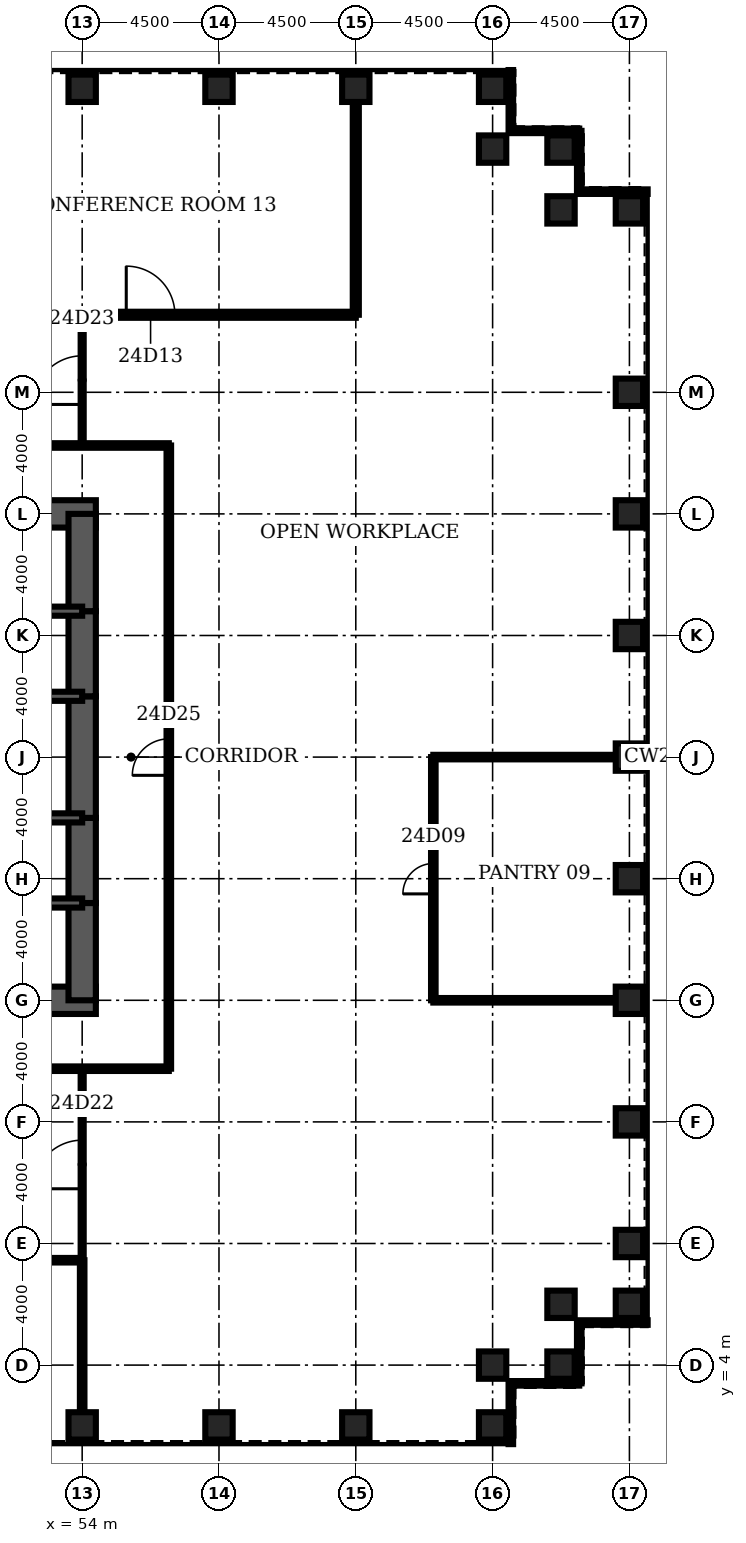
"""IFC4 building model, lengths in metres.
Left out: names, types, materials, properties, quantities, classifications, styles, units other than length and angle.
Written with IfcOpenShell. Run it as: python <this file> out.ifc"""

import sys

from ifc_helpers import new_model, si_unit, direction, frame, frame_2d, origin, origin_2d, place, context, subcontext, project, spatial, rectangle, hollow_rectangle, extrude, element, fill, save


model = new_model("IFC4")
c1 = context("Model", 3, precision=1e-05, world=origin(), true_north=direction((0.0, 1.0)))
c2 = subcontext(c1, "Body", "Model", "MODEL_VIEW")
j1 = project(units=[si_unit("LENGTHUNIT", "METRE"), si_unit("PLANEANGLEUNIT", "RADIAN")], contexts=[c1])
p1 = place(None, origin())
s1 = spatial("IfcSite", under=j1, at=p1, CompositionType="ELEMENT")
p2 = place(p1, origin())
s2 = spatial("IfcBuilding", under=s1, at=p2, CompositionType="ELEMENT")
p3 = place(p2, frame((0.0, 0.0, 113.1)))
s3 = spatial("IfcBuildingStorey", under=s2, at=p3, CompositionType="ELEMENT", Elevation=113.1)
for number, where, z_axis, x_axis in (
    (1, (54.0, 2.0, 0.0), (0.0, 0.0, 1.0), (0.0, 1.0, 0.0)),
    (2, (58.5, 2.0, 0.0), (0.0, 0.0, 1.0), (0.0, 1.0, 0.0)),
    (3, (63.0, 2.0, 0.0), (0.0, 0.0, 1.0), (0.0, 1.0, 0.0)),
    (4, (67.5, 2.0, 0.0), (0.0, 0.0, 1.0), (0.0, 1.0, 0.0)),
    (5, (67.5, 4.0, 0.0), (0.0, 0.0, 1.0), (0.0, 1.0, 0.0)),
    (6, (69.75, 4.0, 0.0), (0.0, 0.0, 1.0), (1.0, 0.0, 0.0)),
    (7, (69.75, 6.0, 0.0), (0.0, 0.0, 1.0), (1.0, 0.0, 0.0)),
    (8, (72.0, 6.0, 0.0), (0.0, 0.0, 1.0), (1.0, 0.0, 0.0)),
    (9, (72.0, 8.0, 0.0), (0.0, 0.0, 1.0), (1.0, 0.0, 0.0)),
    (10, (72.0, 12.0, 0.0), (0.0, 0.0, 1.0), (1.0, 0.0, 0.0)),
    (11, (72.0, 16.0, 0.0), (0.0, 0.0, 1.0), (1.0, 0.0, 0.0)),
    (12, (72.0, 20.0, 0.0), (0.0, 0.0, 1.0), (1.0, 0.0, 0.0)),
    (13, (72.0, 24.0, 0.0), (0.0, 0.0, 1.0), (1.0, 0.0, 0.0)),
    (14, (72.0, 28.0, 0.0), (0.0, 0.0, 1.0), (1.0, 0.0, 0.0)),
    (15, (72.0, 32.0, 0.0), (0.0, 0.0, 1.0), (1.0, 0.0, 0.0)),
    (16, (72.0, 36.0, 0.0), (0.0, 0.0, 1.0), (1.0, 0.0, 0.0)),
    (17, (72.0, 42.0, 0.0), (0.0, 0.0, 1.0), (1.0, 0.0, 0.0)),
    (18, (69.75, 42.0, 0.0), (0.0, 0.0, 1.0), (1.0, 0.0, 0.0)),
    (19, (69.75, 44.0, 0.0), (0.0, 0.0, 1.0), (1.0, 0.0, 0.0)),
    (20, (67.5, 44.0, 0.0), (0.0, 0.0, 1.0), (0.0, 1.0, 0.0)),
    (21, (67.5, 46.0, 0.0), (0.0, 0.0, 1.0), (0.0, 1.0, 0.0)),
    (22, (63.0, 46.0, 0.0), (0.0, 0.0, 1.0), (0.0, 1.0, 0.0)),
    (23, (58.5, 46.0, 0.0), (0.0, 0.0, 1.0), (0.0, 1.0, 0.0)),
    (24, (54.0, 46.0, 0.0), (0.0, 0.0, 1.0), (0.0, 1.0, 0.0)),
):
    element("IfcColumn", number, at=place(p3, frame(where, z_axis=z_axis, x_axis=x_axis)), inside=s3, PredefinedType="COLUMN", context=c2, shape_type="SweptSolid", body=[
        extrude(hollow_rectangle(XDim=0.9, YDim=0.9, WallThickness=0.11, at=origin_2d()), origin(), (0.0, 0.0, 1.0), 4.2),
    ])
for number, where, z_axis, x_axis in (
    (25, (45.0, 16.0, 0.0), (0.0, 0.0, 1.0), (1.0, 0.0, 0.0)),
    (26, (54.45, 32.0, 0.0), (0.0, 0.0, 1.0), (-1.0, 0.0, 0.0)),
):
    element("IfcWall", number, at=place(p3, frame(where, z_axis=z_axis, x_axis=x_axis)), inside=s3, PredefinedType="SHEAR", context=c2, shape_type="SweptSolid", body=[
        extrude(rectangle(XDim=9.45, YDim=0.9, at=frame_2d((4.725, 0.0))), origin(), (0.0, 0.0, 1.0), 4.2),
    ])
p4 = place(p3, frame((54.0, 16.0, 0.0), z_axis=(0.0, 0.0, 1.0), x_axis=(0.0, 1.0, 0.0)))
e27 = element("IfcWall", 27, at=p4, inside=s3, PredefinedType="SHEAR", context=c2, shape_type="SweptSolid", body=[
    extrude(rectangle(XDim=3.2, YDim=0.9, at=frame_2d((1.6, 0.0))), origin(), (0.0, 0.0, 1.0), 4.2),
])
p5 = place(p3, frame((54.0, 19.2, 0.0), z_axis=(0.0, 0.0, 1.0), x_axis=(0.0, 1.0, 0.0)))
e28 = element("IfcWall", 28, at=p5, inside=s3, PredefinedType="SHEAR", context=c2, shape_type="SweptSolid", body=[
    extrude(rectangle(XDim=2.8, YDim=0.9, at=frame_2d((1.4, 0.0))), origin(), (0.0, 0.0, 1.0), 4.2),
])
p6 = place(p5, frame((0.4, 0.0, 0.0)))
e29 = element("IfcOpeningElement", 29, at=p6, cuts=e28, PredefinedType="OPENING", context=c2, shape_type="SweptSolid", body=[
    extrude(rectangle(XDim=1.8, YDim=2.1, at=frame_2d((0.9, 1.05))), frame((0.0, 0.46, 0.0), z_axis=(0.0, -1.0, 0.0), x_axis=(1.0, 0.0, 0.0)), (0.0, 0.0, 1.0), 0.92),
])
p7 = place(p3, frame((54.0, 22.0, 0.0), z_axis=(0.0, 0.0, 1.0), x_axis=(0.0, 1.0, 0.0)))
e30 = element("IfcWall", 30, at=p7, inside=s3, PredefinedType="SHEAR", context=c2, shape_type="SweptSolid", body=[
    extrude(rectangle(XDim=4.0, YDim=0.9, at=frame_2d((2.0, 0.0))), origin(), (0.0, 0.0, 1.0), 4.2),
])
p8 = place(p3, frame((54.0, 26.0, 0.0), z_axis=(0.0, 0.0, 1.0), x_axis=(0.0, 1.0, 0.0)))
e31 = element("IfcWall", 31, at=p8, inside=s3, PredefinedType="SHEAR", context=c2, shape_type="SweptSolid", body=[
    extrude(rectangle(XDim=2.8, YDim=0.9, at=frame_2d((1.4, 0.0))), origin(), (0.0, 0.0, 1.0), 4.2),
])
p9 = place(p8, frame((0.6, 0.0, 0.0)))
e32 = element("IfcOpeningElement", 32, at=p9, cuts=e31, PredefinedType="OPENING", context=c2, shape_type="SweptSolid", body=[
    extrude(rectangle(XDim=1.8, YDim=2.1, at=frame_2d((0.9, 1.05))), frame((0.0, 0.46, 0.0), z_axis=(0.0, -1.0, 0.0), x_axis=(1.0, 0.0, 0.0)), (0.0, 0.0, 1.0), 0.92),
])
p10 = place(p3, frame((54.0, 28.8, 0.0), z_axis=(0.0, 0.0, 1.0), x_axis=(0.0, 1.0, 0.0)))
e33 = element("IfcWall", 33, at=p10, inside=s3, PredefinedType="SHEAR", context=c2, shape_type="SweptSolid", body=[
    extrude(rectangle(XDim=3.2, YDim=0.9, at=frame_2d((1.6, 0.0))), origin(), (0.0, 0.0, 1.0), 4.2),
])
p11 = place(p3, frame((45.0, 19.2, 0.0), z_axis=(0.0, 0.0, 1.0), x_axis=(1.0, 0.0, 0.0)))
e34 = element("IfcWall", 34, at=p11, inside=s3, PredefinedType="SOLIDWALL", context=c2, shape_type="SweptSolid", body=[
    extrude(rectangle(XDim=9.0, YDim=0.3, at=frame_2d((4.5, 0.0))), origin(), (0.0, 0.0, 1.0), 4.2),
])
p12 = place(p11, frame((7.35, 0.0, 0.0)))
e35 = element("IfcOpeningElement", 35, at=p12, cuts=e34, PredefinedType="OPENING", context=c2, shape_type="SweptSolid", body=[
    extrude(rectangle(XDim=1.0, YDim=2.1, at=frame_2d((0.5, 1.05))), frame((0.0, 0.16, 0.0), z_axis=(0.0, -1.0, 0.0), x_axis=(1.0, 0.0, 0.0)), (0.0, 0.0, 1.0), 0.32),
])
p13 = place(p3, frame((45.0, 28.8, 0.0), z_axis=(0.0, 0.0, 1.0), x_axis=(1.0, 0.0, 0.0)))
e36 = element("IfcWall", 36, at=p13, inside=s3, PredefinedType="SOLIDWALL", context=c2, shape_type="SweptSolid", body=[
    extrude(rectangle(XDim=9.0, YDim=0.3, at=frame_2d((4.5, 0.0))), origin(), (0.0, 0.0, 1.0), 4.2),
])
p14 = place(p13, frame((7.35, 0.0, 0.0)))
e37 = element("IfcOpeningElement", 37, at=p14, cuts=e36, PredefinedType="OPENING", context=c2, shape_type="SweptSolid", body=[
    extrude(rectangle(XDim=1.0, YDim=2.1, at=frame_2d((0.5, 1.05))), frame((0.0, 0.16, 0.0), z_axis=(0.0, -1.0, 0.0), x_axis=(1.0, 0.0, 0.0)), (0.0, 0.0, 1.0), 0.32),
])
p15 = place(p3, frame((48.0, 22.0, 0.0), z_axis=(0.0, 0.0, 1.0), x_axis=(1.0, 0.0, 0.0)))
e38 = element("IfcWall", 38, at=p15, inside=s3, PredefinedType="SOLIDWALL", context=c2, shape_type="SweptSolid", body=[
    extrude(rectangle(XDim=6.0, YDim=0.3, at=frame_2d((3.0, 0.0))), origin(), (0.0, 0.0, 1.0), 4.2),
])
p16 = place(p15, frame((2.0, 0.0, 0.0)))
e39 = element("IfcOpeningElement", 39, at=p16, cuts=e38, PredefinedType="OPENING", context=c2, shape_type="SweptSolid", body=[
    extrude(rectangle(XDim=1.0, YDim=2.1, at=frame_2d((0.5, 1.05))), frame((0.0, 0.16, 0.0), z_axis=(0.0, -1.0, 0.0), x_axis=(1.0, 0.0, 0.0)), (0.0, 0.0, 1.0), 0.32),
])
p17 = place(p15, frame((4.0, 0.0, 0.0)))
e40 = element("IfcOpeningElement", 40, at=p17, cuts=e38, PredefinedType="OPENING", context=c2, shape_type="SweptSolid", body=[
    extrude(rectangle(XDim=1.0, YDim=2.1, at=frame_2d((0.5, 1.05))), frame((0.0, 0.16, 0.0), z_axis=(0.0, -1.0, 0.0), x_axis=(1.0, 0.0, 0.0)), (0.0, 0.0, 1.0), 0.32),
])
p18 = place(p3, frame((48.0, 26.0, 0.0), z_axis=(0.0, 0.0, 1.0), x_axis=(1.0, 0.0, 0.0)))
e41 = element("IfcWall", 41, at=p18, inside=s3, PredefinedType="SOLIDWALL", context=c2, shape_type="SweptSolid", body=[
    extrude(rectangle(XDim=6.0, YDim=0.3, at=frame_2d((3.0, 0.0))), origin(), (0.0, 0.0, 1.0), 4.2),
])
p19 = place(p3, frame((45.0, 7.45, 0.0), z_axis=(0.0, 0.0, 1.0), x_axis=(1.0, 0.0, 0.0)))
e42 = element("IfcWall", 42, at=p19, inside=s3, PredefinedType="PARTITIONING", context=c2, shape_type="SweptSolid", body=[
    extrude(rectangle(XDim=9.0, YDim=0.15, at=frame_2d((4.5, 0.0))), origin(), (0.0, 0.0, 1.0), 3.0),
])
p20 = place(p19, frame((4.0, 0.0, 0.0)))
e43 = element("IfcOpeningElement", 43, at=p20, cuts=e42, PredefinedType="OPENING", context=c2, shape_type="SweptSolid", body=[
    extrude(rectangle(XDim=1.0, YDim=2.1, at=frame_2d((0.5, 1.05))), frame((0.0, 0.085, 0.0), z_axis=(0.0, -1.0, 0.0), x_axis=(1.0, 0.0, 0.0)), (0.0, 0.0, 1.0), 0.17),
])
p21 = place(p3, frame((35.0, 13.75, 0.0), z_axis=(0.0, 0.0, 1.0), x_axis=(1.0, 0.0, 0.0)))
e44 = element("IfcWall", 44, at=p21, inside=s3, PredefinedType="PARTITIONING", context=c2, shape_type="SweptSolid", body=[
    extrude(rectangle(XDim=21.85, YDim=0.15, at=frame_2d((10.925, 0.0))), origin(), (0.0, 0.0, 1.0), 3.0),
])
p22 = place(p21, frame((8.925, 0.0, 0.0)))
e45 = element("IfcOpeningElement", 45, at=p22, cuts=e44, PredefinedType="OPENING", context=c2, shape_type="SweptSolid", body=[
    extrude(rectangle(XDim=1.2, YDim=2.1, at=frame_2d((0.6, 1.05))), frame((0.0, 0.085, 0.0), z_axis=(0.0, -1.0, 0.0), x_axis=(1.0, 0.0, 0.0)), (0.0, 0.0, 1.0), 0.17),
])
for number, where, z_axis, x_axis in (
    (46, (65.55, 16.0, 0.0), (0.0, 0.0, 1.0), (1.0, 0.0, 0.0)),
    (47, (65.55, 24.0, 0.0), (0.0, 0.0, 1.0), (1.0, 0.0, 0.0)),
):
    element("IfcWall", number, at=place(p3, frame(where, z_axis=z_axis, x_axis=x_axis)), inside=s3, PredefinedType="PARTITIONING", context=c2, shape_type="SweptSolid", body=[
        extrude(rectangle(XDim=6.0, YDim=0.15, at=frame_2d((3.0, 0.0))), origin(), (0.0, 0.0, 1.0), 3.0),
    ])
p23 = place(p3, frame((15.15, 34.25, 0.0), z_axis=(0.0, 0.0, 1.0), x_axis=(1.0, 0.0, 0.0)))
e48 = element("IfcWall", 48, at=p23, inside=s3, PredefinedType="PARTITIONING", context=c2, shape_type="SweptSolid", body=[
    extrude(rectangle(XDim=41.7, YDim=0.15, at=frame_2d((20.85, 0.0))), origin(), (0.0, 0.0, 1.0), 3.0),
])
p24 = place(p23, frame((20.25, 0.0, 0.0)))
e49 = element("IfcOpeningElement", 49, at=p24, cuts=e48, PredefinedType="OPENING", context=c2, shape_type="SweptSolid", body=[
    extrude(rectangle(XDim=1.2, YDim=2.1, at=frame_2d((0.6, 1.05))), frame((0.0, 0.085, 0.0), z_axis=(0.0, -1.0, 0.0), x_axis=(1.0, 0.0, 0.0)), (0.0, 0.0, 1.0), 0.17),
])
p25 = place(p3, frame((49.5, 38.55, 0.0), z_axis=(0.0, 0.0, 1.0), x_axis=(1.0, 0.0, 0.0)))
e50 = element("IfcWall", 50, at=p25, inside=s3, PredefinedType="PARTITIONING", context=c2, shape_type="SweptSolid", body=[
    extrude(rectangle(XDim=13.5, YDim=0.2, at=frame_2d((6.75, 0.0))), origin(), (0.0, 0.0, 1.0), 3.0),
])
p26 = place(p25, frame((5.95, 0.0, 0.0)))
e51 = element("IfcOpeningElement", 51, at=p26, cuts=e50, PredefinedType="OPENING", context=c2, shape_type="SweptSolid", body=[
    extrude(rectangle(XDim=1.6, YDim=2.1, at=frame_2d((0.8, 1.05))), frame((0.0, 0.11, 0.0), z_axis=(0.0, -1.0, 0.0), x_axis=(1.0, 0.0, 0.0)), (0.0, 0.0, 1.0), 0.22),
])
p27 = place(p3, frame((54.0, 2.45, 0.0), z_axis=(0.0, 0.0, 1.0), x_axis=(0.0, 1.0, 0.0)))
e52 = element("IfcWall", 52, at=p27, inside=s3, PredefinedType="PARTITIONING", context=c2, shape_type="SweptSolid", body=[
    extrude(rectangle(XDim=5.0, YDim=0.15, at=frame_2d((2.5, 0.0))), origin(), (0.0, 0.0, 1.0), 3.0),
])
p28 = place(p3, frame((54.0, 7.45, 0.0), z_axis=(0.0, 0.0, 1.0), x_axis=(0.0, 1.0, 0.0)))
e53 = element("IfcWall", 53, at=p28, inside=s3, PredefinedType="PARTITIONING", context=c2, shape_type="SweptSolid", body=[
    extrude(rectangle(XDim=6.3, YDim=0.1, at=frame_2d((3.15, 0.0))), origin(), (0.0, 0.0, 1.0), 3.0),
])
p29 = place(p28, frame((2.35, 0.0, 0.0)))
e54 = element("IfcOpeningElement", 54, at=p29, cuts=e53, PredefinedType="OPENING", context=c2, shape_type="SweptSolid", body=[
    extrude(rectangle(XDim=1.6, YDim=2.1, at=frame_2d((0.8, 1.05))), frame((0.0, 0.06, 0.0), z_axis=(0.0, -1.0, 0.0), x_axis=(1.0, 0.0, 0.0)), (0.0, 0.0, 1.0), 0.12),
])
p30 = place(p3, frame((54.0, 34.25, 0.0), z_axis=(0.0, 0.0, 1.0), x_axis=(0.0, 1.0, 0.0)))
e55 = element("IfcWall", 55, at=p30, inside=s3, PredefinedType="PARTITIONING", context=c2, shape_type="SweptSolid", body=[
    extrude(rectangle(XDim=4.3, YDim=0.1, at=frame_2d((2.15, 0.0))), origin(), (0.0, 0.0, 1.0), 3.0),
])
p31 = place(p30, frame((1.35, 0.0, 0.0)))
e56 = element("IfcOpeningElement", 56, at=p31, cuts=e55, PredefinedType="OPENING", context=c2, shape_type="SweptSolid", body=[
    extrude(rectangle(XDim=1.6, YDim=2.1, at=frame_2d((0.8, 1.05))), frame((0.0, 0.06, 0.0), z_axis=(0.0, -1.0, 0.0), x_axis=(1.0, 0.0, 0.0)), (0.0, 0.0, 1.0), 0.12),
])
p32 = place(p3, frame((56.85, 13.75, 0.0), z_axis=(0.0, 0.0, 1.0), x_axis=(0.0, 1.0, 0.0)))
e57 = element("IfcWall", 57, at=p32, inside=s3, PredefinedType="PARTITIONING", context=c2, shape_type="SweptSolid", body=[
    extrude(rectangle(XDim=20.5, YDim=0.15, at=frame_2d((10.25, 0.0))), origin(), (0.0, 0.0, 1.0), 3.0),
])
p33 = place(p32, frame((9.65, 0.0, 0.0)))
e58 = element("IfcOpeningElement", 58, at=p33, cuts=e57, PredefinedType="OPENING", context=c2, shape_type="SweptSolid", body=[
    extrude(rectangle(XDim=1.2, YDim=2.1, at=frame_2d((0.6, 1.05))), frame((0.0, 0.085, 0.0), z_axis=(0.0, -1.0, 0.0), x_axis=(1.0, 0.0, 0.0)), (0.0, 0.0, 1.0), 0.17),
])
p34 = place(p3, frame((63.0, 38.55, 0.0), z_axis=(0.0, 0.0, 1.0), x_axis=(0.0, 1.0, 0.0)))
e59 = element("IfcWall", 59, at=p34, inside=s3, PredefinedType="PARTITIONING", context=c2, shape_type="SweptSolid", body=[
    extrude(rectangle(XDim=7.0, YDim=0.2, at=frame_2d((3.5, 0.0))), origin(), (0.0, 0.0, 1.0), 3.0),
])
p35 = place(p3, frame((65.55, 16.0, 0.0), z_axis=(0.0, 0.0, 1.0), x_axis=(0.0, 1.0, 0.0)))
e60 = element("IfcWall", 60, at=p35, inside=s3, PredefinedType="PARTITIONING", context=c2, shape_type="SweptSolid", body=[
    extrude(rectangle(XDim=8.0, YDim=0.15, at=frame_2d((4.0, 0.0))), origin(), (0.0, 0.0, 1.0), 3.0),
])
p36 = place(p35, frame((3.5, 0.0, 0.0)))
e61 = element("IfcOpeningElement", 61, at=p36, cuts=e60, PredefinedType="OPENING", context=c2, shape_type="SweptSolid", body=[
    extrude(rectangle(XDim=1.0, YDim=2.1, at=frame_2d((0.5, 1.05))), frame((0.0, 0.085, 0.0), z_axis=(0.0, -1.0, 0.0), x_axis=(1.0, 0.0, 0.0)), (0.0, 0.0, 1.0), 0.17),
])
p37 = place(p3, frame((68.1, 1.4, 0.0), z_axis=(0.0, 0.0, 1.0), x_axis=(0.0, 1.0, 0.0)))
e62 = element("IfcWall", 62, at=p37, inside=s3, PredefinedType="ELEMENTEDWALL", context=c2, shape_type="SweptSolid", body=[
    extrude(rectangle(XDim=2.0, YDim=0.15, at=frame_2d((1.0, 0.0))), origin(), (0.0, 0.0, 1.0), 4.04),
])
p38 = place(p3, frame((68.1, 3.4, 0.0), z_axis=(0.0, 0.0, 1.0), x_axis=(1.0, 0.0, 0.0)))
e63 = element("IfcWall", 63, at=p38, inside=s3, PredefinedType="ELEMENTEDWALL", context=c2, shape_type="SweptSolid", body=[
    extrude(rectangle(XDim=2.25, YDim=0.15, at=frame_2d((1.125, 0.0))), origin(), (0.0, 0.0, 1.0), 4.04),
])
p39 = place(p3, frame((70.35, 3.4, 0.0), z_axis=(0.0, 0.0, 1.0), x_axis=(0.0, 1.0, 0.0)))
e64 = element("IfcWall", 64, at=p39, inside=s3, PredefinedType="ELEMENTEDWALL", context=c2, shape_type="SweptSolid", body=[
    extrude(rectangle(XDim=2.0, YDim=0.15, at=frame_2d((1.0, 0.0))), origin(), (0.0, 0.0, 1.0), 4.04),
])
for number, where, z_axis, x_axis in (
    (65, (70.35, 5.4, 0.0), (0.0, 0.0, 1.0), (1.0, 0.0, 0.0)),
    (66, (72.6, 42.6, 0.0), (0.0, 0.0, 1.0), (-1.0, 0.0, 0.0)),
):
    element("IfcWall", number, at=place(p3, frame(where, z_axis=z_axis, x_axis=x_axis)), inside=s3, PredefinedType="ELEMENTEDWALL", context=c2, shape_type="SweptSolid", body=[
        extrude(rectangle(XDim=2.25, YDim=0.15, at=frame_2d((1.125, 0.0))), origin(), (0.0, 0.0, 1.0), 4.04),
    ])
p40 = place(p3, frame((70.35, 42.6, 0.0), z_axis=(0.0, 0.0, 1.0), x_axis=(0.0, 1.0, 0.0)))
e67 = element("IfcWall", 67, at=p40, inside=s3, PredefinedType="ELEMENTEDWALL", context=c2, shape_type="SweptSolid", body=[
    extrude(rectangle(XDim=2.0, YDim=0.15, at=frame_2d((1.0, 0.0))), origin(), (0.0, 0.0, 1.0), 4.04),
])
p41 = place(p3, frame((70.35, 44.6, 0.0), z_axis=(0.0, 0.0, 1.0), x_axis=(-1.0, 0.0, 0.0)))
e68 = element("IfcWall", 68, at=p41, inside=s3, PredefinedType="ELEMENTEDWALL", context=c2, shape_type="SweptSolid", body=[
    extrude(rectangle(XDim=2.25, YDim=0.15, at=frame_2d((1.125, 0.0))), origin(), (0.0, 0.0, 1.0), 4.04),
])
p42 = place(p3, frame((68.1, 44.6, 0.0), z_axis=(0.0, 0.0, 1.0), x_axis=(0.0, 1.0, 0.0)))
e69 = element("IfcWall", 69, at=p42, inside=s3, PredefinedType="ELEMENTEDWALL", context=c2, shape_type="SweptSolid", body=[
    extrude(rectangle(XDim=2.0, YDim=0.15, at=frame_2d((1.0, 0.0))), origin(), (0.0, 0.0, 1.0), 4.04),
])
p43 = place(p36, origin())
e70 = element("IfcDoor", 70, at=p43, inside=s3, OperationType="SINGLE_SWING_LEFT", PredefinedType="DOOR", context=c2, shape_type="SweptSolid", body=[
    extrude(rectangle(XDim=1.0, YDim=2.1, at=frame_2d((0.5, 1.05))), frame((0.0, 0.025, 0.0), z_axis=(0.0, -1.0, 0.0), x_axis=(1.0, 0.0, 0.0)), (0.0, 0.0, 1.0), 0.05),
])
fill(e61, e70)
p44 = place(p26, origin())
e71 = element("IfcDoor", 71, at=p44, inside=s3, OperationType="SINGLE_SWING_LEFT", PredefinedType="DOOR", context=c2, shape_type="SweptSolid", body=[
    extrude(rectangle(XDim=1.6, YDim=2.1, at=frame_2d((0.8, 1.05))), frame((0.0, 0.025, 0.0), z_axis=(0.0, -1.0, 0.0), x_axis=(1.0, 0.0, 0.0)), (0.0, 0.0, 1.0), 0.05),
])
fill(e51, e71)
p45 = place(p29, origin())
e72 = element("IfcDoor", 72, at=p45, inside=s3, OperationType="SINGLE_SWING_LEFT", PredefinedType="DOOR", context=c2, shape_type="SweptSolid", body=[
    extrude(rectangle(XDim=1.6, YDim=2.1, at=frame_2d((0.8, 1.05))), frame((0.0, 0.025, 0.0), z_axis=(0.0, -1.0, 0.0), x_axis=(1.0, 0.0, 0.0)), (0.0, 0.0, 1.0), 0.05),
])
fill(e54, e72)
p46 = place(p31, origin())
e73 = element("IfcDoor", 73, at=p46, inside=s3, OperationType="SINGLE_SWING_LEFT", PredefinedType="DOOR", context=c2, shape_type="SweptSolid", body=[
    extrude(rectangle(XDim=1.6, YDim=2.1, at=frame_2d((0.8, 1.05))), frame((0.0, 0.025, 0.0), z_axis=(0.0, -1.0, 0.0), x_axis=(1.0, 0.0, 0.0)), (0.0, 0.0, 1.0), 0.05),
])
fill(e56, e73)
p47 = place(p33, origin())
e74 = element("IfcDoor", 74, at=p47, inside=s3, OperationType="SINGLE_SWING_LEFT", PredefinedType="DOOR", context=c2, shape_type="SweptSolid", body=[
    extrude(rectangle(XDim=1.2, YDim=2.1, at=frame_2d((0.6, 1.05))), frame((0.0, 0.025, 0.0), z_axis=(0.0, -1.0, 0.0), x_axis=(1.0, 0.0, 0.0)), (0.0, 0.0, 1.0), 0.05),
])
fill(e58, e74)
p48 = place(p12, origin())
e75 = element("IfcDoor", 75, at=p48, inside=s3, OperationType="SINGLE_SWING_RIGHT", PredefinedType="DOOR", context=c2, shape_type="SweptSolid", body=[
    extrude(rectangle(XDim=1.0, YDim=2.1, at=frame_2d((0.5, 1.05))), frame((0.0, 0.025, 0.0), z_axis=(0.0, -1.0, 0.0), x_axis=(1.0, 0.0, 0.0)), (0.0, 0.0, 1.0), 0.05),
])
fill(e35, e75)
p49 = place(p14, origin())
e76 = element("IfcDoor", 76, at=p49, inside=s3, OperationType="SINGLE_SWING_RIGHT", PredefinedType="DOOR", context=c2, shape_type="SweptSolid", body=[
    extrude(rectangle(XDim=1.0, YDim=2.1, at=frame_2d((0.5, 1.05))), frame((0.0, 0.025, 0.0), z_axis=(0.0, -1.0, 0.0), x_axis=(1.0, 0.0, 0.0)), (0.0, 0.0, 1.0), 0.05),
])
fill(e37, e76)
p50 = place(p6, origin())
e77 = element("IfcDoor", 77, at=p50, inside=s3, OperationType="SINGLE_SWING_LEFT", PredefinedType="DOOR", context=c2, shape_type="SweptSolid", body=[
    extrude(rectangle(XDim=1.8, YDim=2.1, at=frame_2d((0.9, 1.05))), frame((0.0, 0.45, 0.0), z_axis=(0.0, -1.0, 0.0), x_axis=(1.0, 0.0, 0.0)), (0.0, 0.0, 1.0), 0.899),
])
fill(e29, e77)
p51 = place(p9, origin())
e78 = element("IfcDoor", 78, at=p51, inside=s3, OperationType="SINGLE_SWING_LEFT", PredefinedType="DOOR", context=c2, shape_type="SweptSolid", body=[
    extrude(rectangle(XDim=1.8, YDim=2.1, at=frame_2d((0.9, 1.05))), frame((0.0, 0.45, 0.0), z_axis=(0.0, -1.0, 0.0), x_axis=(1.0, 0.0, 0.0)), (0.0, 0.0, 1.0), 0.899),
])
fill(e32, e78)
save(model, sys.argv[1])
